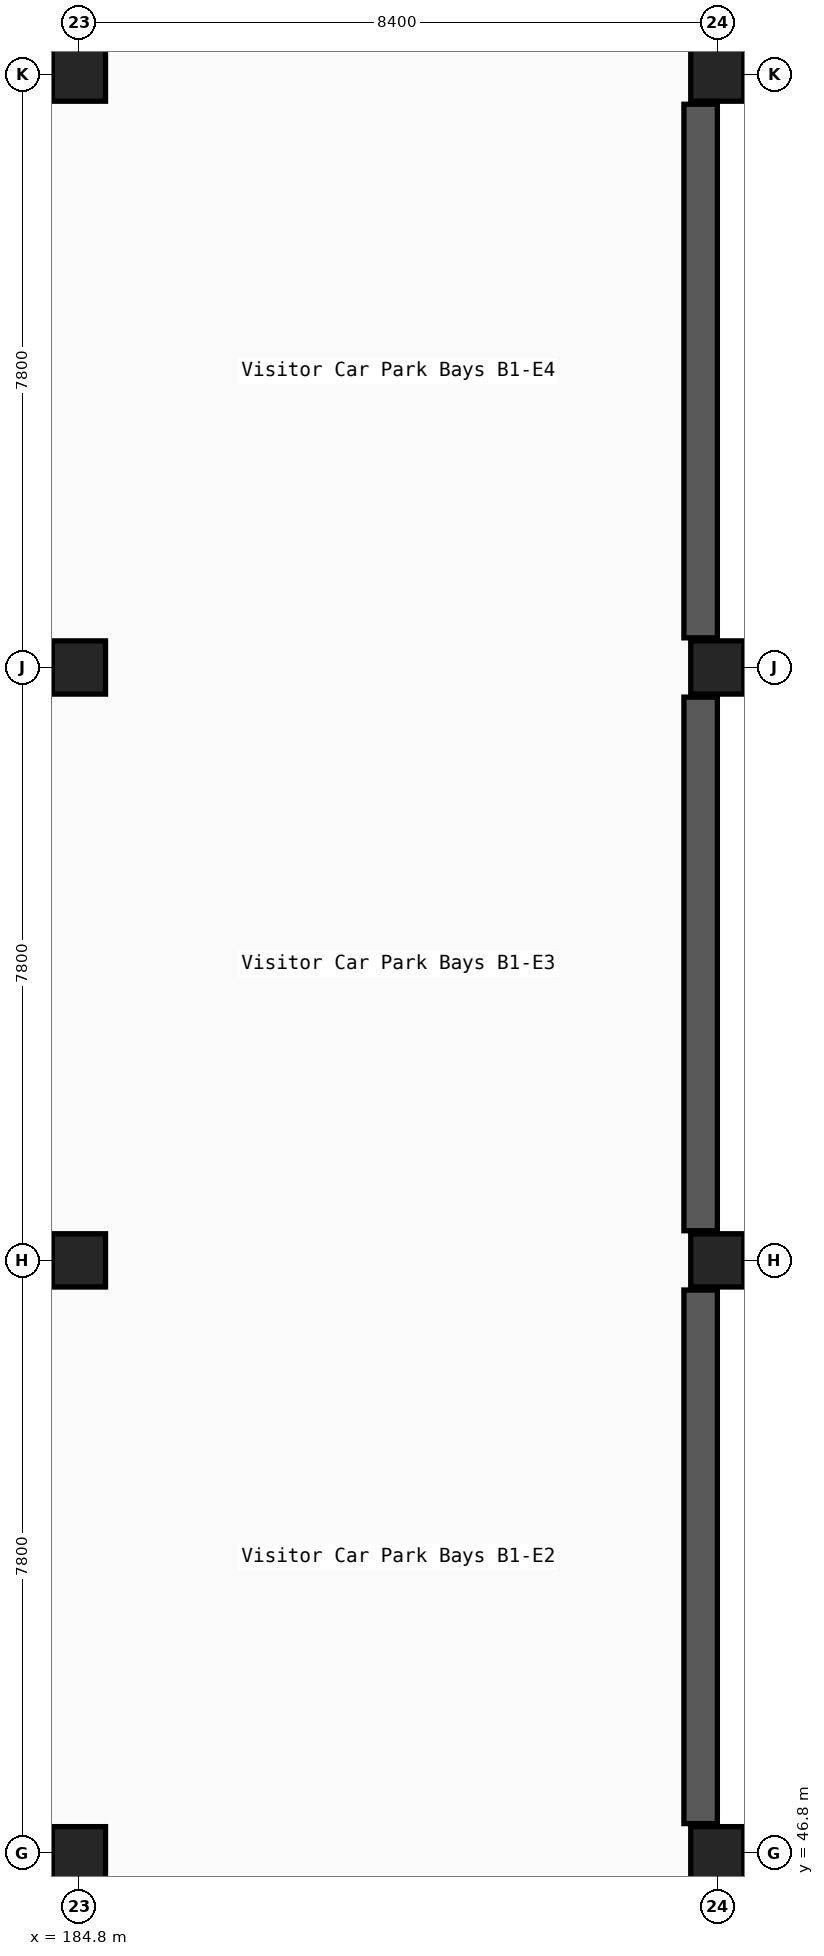
"""IFC4 building model, lengths in metres.
Left out: names, types, materials, properties, quantities, classifications, styles, units other than length and angle.
Written with IfcOpenShell. Run it as: python <this file> out.ifc"""

import sys

from ifc_helpers import new_model, si_unit, direction, frame, frame_2d, origin, origin_2d, place, context, subcontext, project, spatial, rectangle, i_section, extrude, element, save


model = new_model("IFC4")
c1 = context("Model", 3, precision=1e-05, world=origin(), true_north=direction((0.0, 1.0)))
c2 = subcontext(c1, "Body", "Model", "MODEL_VIEW")
j1 = project(units=[si_unit("LENGTHUNIT", "METRE"), si_unit("PLANEANGLEUNIT", "RADIAN")], contexts=[c1])
p1 = place(None, origin())
s1 = spatial("IfcSite", under=j1, at=p1, CompositionType="ELEMENT")
p2 = place(p1, origin())
s2 = spatial("IfcBuilding", under=s1, at=p2, CompositionType="ELEMENT")
p3 = place(p2, frame((0.0, 0.0, -5.1)))
s3 = spatial("IfcBuildingStorey", under=s2, at=p3, CompositionType="ELEMENT", Elevation=-5.1)
for number, where, z_axis, x_axis in (
    (1, (184.8, 46.8, -0.22), (0.0, 0.0, 1.0), (1.0, 0.0, 0.0)),
    (2, (184.8, 54.6, -0.22), (0.0, 0.0, 1.0), (1.0, 0.0, 0.0)),
    (3, (184.8, 62.4, -0.22), (0.0, 0.0, 1.0), (1.0, 0.0, 0.0)),
    (4, (184.8, 70.2, -0.22), (0.0, 0.0, 1.0), (1.0, 0.0, 0.0)),
    (5, (193.2, 46.8, -0.22), (0.0, 0.0, 1.0), (1.0, 0.0, 0.0)),
    (6, (193.2, 54.6, -0.22), (0.0, 0.0, 1.0), (1.0, 0.0, 0.0)),
    (7, (193.2, 62.4, -0.22), (0.0, 0.0, 1.0), (1.0, 0.0, 0.0)),
    (8, (193.2, 70.2, -0.22), (0.0, 0.0, 1.0), (1.0, 0.0, 0.0)),
):
    element("IfcColumn", number, at=place(p3, frame(where, z_axis=z_axis, x_axis=x_axis)), inside=s3, PredefinedType="COLUMN", context=c2, shape_type="SweptSolid", body=[
        extrude(i_section(OverallWidth=0.3, OverallDepth=0.7, WebThickness=0.017, FlangeThickness=0.032, FilletRadius=0.027, at=origin_2d()), origin(), (0.0, 0.0, 1.0), 5.32),
    ])
for number, where, z_axis, x_axis in (
    (9, (192.98, 47.19, 0.0), (0.0, 0.0, 1.0), (0.0, 1.0, 0.0)),
    (10, (192.98, 54.99, 0.0), (0.0, 0.0, 1.0), (0.0, 1.0, 0.0)),
    (11, (192.98, 62.79, 0.0), (0.0, 0.0, 1.0), (0.0, 1.0, 0.0)),
):
    element("IfcWall", number, at=place(p3, frame(where, z_axis=z_axis, x_axis=x_axis)), inside=s3, PredefinedType="USERDEFINED", context=c2, shape_type="SweptSolid", body=[
        extrude(rectangle(XDim=7.02, YDim=0.44, at=frame_2d((3.51, 0.0))), origin(), (0.0, 0.0, 1.0), 4.33),
    ])
save(model, sys.argv[1])
